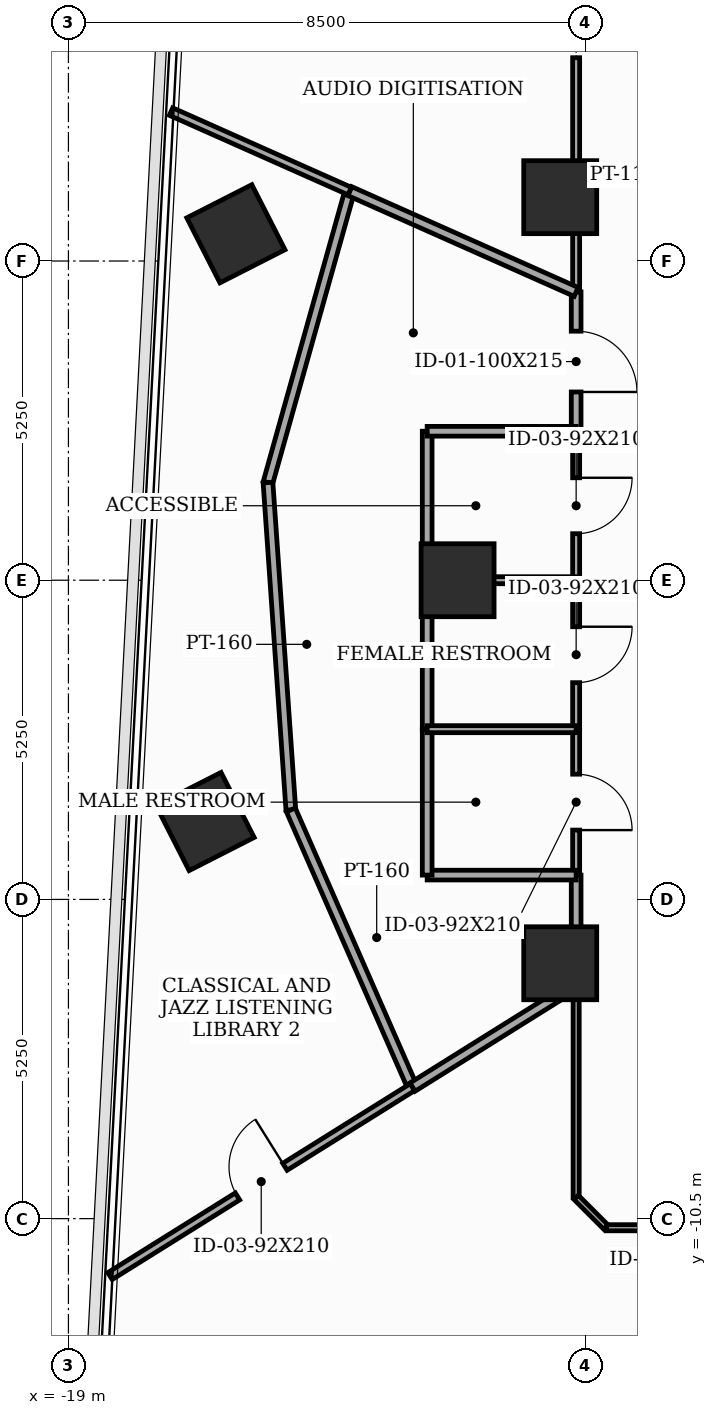
"""IFC4 building model, lengths in metres.
Left out: names, types, materials, properties, quantities, classifications, styles, units other than length and angle.
Written with IfcOpenShell. Run it as: python <this file> out.ifc"""

import sys

from ifc_helpers import new_model, si_unit, direction, frame, frame_2d, origin, origin_2d, place, context, subcontext, project, spatial, rectangle, extrude, element, fill, save


model = new_model("IFC4")
c1 = context("Model", 3, precision=1e-05, world=origin(), true_north=direction((0.0, 1.0)))
c2 = subcontext(c1, "Body", "Model", "MODEL_VIEW")
j1 = project(units=[si_unit("LENGTHUNIT", "METRE"), si_unit("PLANEANGLEUNIT", "RADIAN")], contexts=[c1])
p1 = place(None, origin())
s1 = spatial("IfcSite", under=j1, at=p1, CompositionType="ELEMENT")
p2 = place(p1, origin())
s2 = spatial("IfcBuilding", under=s1, at=p2, CompositionType="ELEMENT")
p3 = place(p2, frame((0.0, 0.0, 138.4)))
s3 = spatial("IfcBuildingStorey", under=s2, at=p3, CompositionType="ELEMENT", Elevation=138.4)
for number, where, z_axis, x_axis in (
    (1, (-10.912, 6.3, 0.0), (0.0, 0.0, 1.0), (1.0, 0.0, 0.0)),
    (2, (-12.6, 0.0, 0.0), (0.0, 0.0, 1.0), (1.0, 0.0, 0.0)),
    (3, (-10.912, -6.3, 0.0), (0.0, 0.0, 1.0), (1.0, 0.0, 0.0)),
    (4, (-16.246, 5.698, 0.0), (0.0, 0.0, 1.0), (0.891, 0.454, 0.0)),
    (5, (-16.752, -3.969, 0.0), (0.0, 0.0, 1.0), (0.891, 0.454, 0.0)),
):
    element("IfcColumn", number, at=place(p3, frame(where, z_axis=z_axis, x_axis=x_axis)), inside=s3, PredefinedType="COLUMN", context=c2, shape_type="SweptSolid", body=[
        extrude(rectangle(XDim=1.2, YDim=1.2, at=origin_2d()), origin(), (0.0, 0.0, 1.0), 3.7),
    ])
p4 = place(p3, frame((-10.65, -4.85, 0.0), z_axis=(0.0, 0.0, 1.0), x_axis=(0.0, -1.0, 0.0)))
e6 = element("IfcWall", 6, at=p4, inside=s3, PredefinedType="PARTITIONING", context=c2, shape_type="SweptSolid", body=[
    extrude(rectangle(XDim=1.805, YDim=0.16, at=frame_2d((0.902, 0.0))), origin(), (0.0, 0.0, 1.0), 2.785),
])
p5 = place(p3, frame((-10.65, 4.742, 0.0), z_axis=(0.0, 0.0, 1.0), x_axis=(0.0, -1.0, 0.0)))
e7 = element("IfcWall", 7, at=p5, inside=s3, PredefinedType="PARTITIONING", context=c2, shape_type="SweptSolid", body=[
    extrude(rectangle(XDim=2.292, YDim=0.16, at=frame_2d((1.146, 0.0))), origin(), (0.0, 0.0, 1.0), 3.5),
])
p6 = place(p5, frame((0.646, 0.0, 0.0)))
e8 = element("IfcOpeningElement", 8, at=p6, cuts=e7, PredefinedType="OPENING", context=c2, shape_type="SweptSolid", body=[
    extrude(rectangle(XDim=1.0, YDim=2.15, at=frame_2d((0.5, 1.075))), frame((0.0, 0.09, 0.0), z_axis=(0.0, -1.0, 0.0), x_axis=(1.0, 0.0, 0.0)), (0.0, 0.0, 1.0), 0.18),
])
p7 = place(p3, frame((-10.65, 0.0, 0.0), z_axis=(0.0, 0.0, 1.0), x_axis=(0.0, -1.0, 0.0)))
e9 = element("IfcWall", 9, at=p7, inside=s3, PredefinedType="PARTITIONING", context=c2, shape_type="SweptSolid", body=[
    extrude(rectangle(XDim=2.45, YDim=0.115, at=frame_2d((1.225, 0.0))), origin(), (0.0, 0.0, 1.0), 2.785),
])
p8 = place(p7, frame((0.765, 0.0, 0.0)))
e10 = element("IfcOpeningElement", 10, at=p8, cuts=e9, PredefinedType="OPENING", context=c2, shape_type="SweptSolid", body=[
    extrude(rectangle(XDim=0.92, YDim=2.1, at=frame_2d((0.46, 1.05))), frame((0.0, 0.067, 0.0), z_axis=(0.0, -1.0, 0.0), x_axis=(1.0, 0.0, 0.0)), (0.0, 0.0, 1.0), 0.135),
])
p9 = place(p3, frame((-10.65, -2.45, 0.0), z_axis=(0.0, 0.0, 1.0), x_axis=(0.0, -1.0, 0.0)))
e11 = element("IfcWall", 11, at=p9, inside=s3, PredefinedType="PARTITIONING", context=c2, shape_type="SweptSolid", body=[
    extrude(rectangle(XDim=2.4, YDim=0.115, at=frame_2d((1.2, 0.0))), origin(), (0.0, 0.0, 1.0), 3.5),
])
p10 = place(p9, frame((0.74, 0.0, 0.0)))
e12 = element("IfcOpeningElement", 12, at=p10, cuts=e11, PredefinedType="OPENING", context=c2, shape_type="SweptSolid", body=[
    extrude(rectangle(XDim=0.92, YDim=2.1, at=frame_2d((0.46, 1.05))), frame((0.0, 0.067, 0.0), z_axis=(0.0, -1.0, 0.0), x_axis=(1.0, 0.0, 0.0)), (0.0, 0.0, 1.0), 0.135),
])
p11 = place(p3, frame((-10.65, -6.655, 0.0), z_axis=(0.0, 0.0, 1.0), x_axis=(0.0, -1.0, 0.0)))
e13 = element("IfcWall", 13, at=p11, inside=s3, PredefinedType="MOVABLE", context=c2, shape_type="SweptSolid", body=[
    extrude(rectangle(XDim=3.495, YDim=0.1, at=frame_2d((1.748, 0.0))), origin(), (0.0, 0.0, 1.0), 2.785),
])
p12 = place(p3, frame((-10.65, -10.15, 0.0), z_axis=(0.0, 0.0, 1.0), x_axis=(0.707106781187, -0.707106781187, 0.0)))
e14 = element("IfcWall", 14, at=p12, inside=s3, PredefinedType="MOVABLE", context=c2, shape_type="SweptSolid", body=[
    extrude(rectangle(XDim=0.707, YDim=0.1, at=frame_2d((0.354, 0.0))), origin(), (0.0, 0.0, 1.0), 3.5),
])
p13 = place(p3, frame((-10.15, -10.65, 0.0), z_axis=(0.0, 0.0, 1.0), x_axis=(1.0, 0.0, 0.0)))
e15 = element("IfcWall", 15, at=p13, inside=s3, PredefinedType="MOVABLE", context=c2, shape_type="SweptSolid", body=[
    extrude(rectangle(XDim=5.847, YDim=0.1, at=frame_2d((2.923, 0.0))), origin(), (0.0, 0.0, 1.0), 2.785),
])
p14 = place(p13, frame((0.709, 0.0, 0.0)))
e16 = element("IfcOpeningElement", 16, at=p14, cuts=e15, PredefinedType="OPENING", context=c2, shape_type="SweptSolid", body=[
    extrude(rectangle(XDim=0.92, YDim=2.1, at=frame_2d((0.46, 1.05))), frame((0.0, 0.06, 0.0), z_axis=(0.0, -1.0, 0.0), x_axis=(1.0, 0.0, 0.0)), (0.0, 0.0, 1.0), 0.12),
])
p15 = place(p3, frame((-10.65, 10.15, 0.0), z_axis=(0.0, 0.0, 1.0), x_axis=(0.0, -1.0, 0.0)))
e17 = element("IfcWall", 17, at=p15, inside=s3, PredefinedType="PARTITIONING", context=c2, shape_type="SweptSolid", body=[
    extrude(rectangle(XDim=5.408, YDim=0.115, at=frame_2d((2.704, 0.0))), origin(), (0.0, 0.0, 1.0), 2.785),
])
p16 = place(p15, frame((0.607, 0.0, 0.0)))
e18 = element("IfcOpeningElement", 18, at=p16, cuts=e17, PredefinedType="OPENING", context=c2, shape_type="SweptSolid", body=[
    extrude(rectangle(XDim=0.95, YDim=2.1, at=frame_2d((0.475, 1.05))), frame((0.0, 0.067, 0.0), z_axis=(0.0, -1.0, 0.0), x_axis=(1.0, 0.0, 0.0)), (0.0, 0.0, 1.0), 0.135),
])
p17 = place(p3, frame((-10.65, 2.45, 0.0), z_axis=(0.0, 0.0, 1.0), x_axis=(0.0, -1.0, 0.0)))
e19 = element("IfcWall", 19, at=p17, inside=s3, PredefinedType="PARTITIONING", context=c2, shape_type="SweptSolid", body=[
    extrude(rectangle(XDim=2.45, YDim=0.115, at=frame_2d((1.225, 0.0))), origin(), (0.0, 0.0, 1.0), 2.785),
])
p18 = place(p17, frame((0.765, 0.0, 0.0)))
e20 = element("IfcOpeningElement", 20, at=p18, cuts=e19, PredefinedType="OPENING", context=c2, shape_type="SweptSolid", body=[
    extrude(rectangle(XDim=0.92, YDim=2.1, at=frame_2d((0.46, 1.05))), frame((0.0, 0.067, 0.0), z_axis=(0.0, -1.0, 0.0), x_axis=(1.0, 0.0, 0.0)), (0.0, 0.0, 1.0), 0.135),
])
p19 = place(p3, frame((-13.1, -2.45, 0.0), z_axis=(0.0, 0.0, 1.0), x_axis=(0.0, 1.0, 0.0)))
e21 = element("IfcWall", 21, at=p19, inside=s3, PredefinedType="PARTITIONING", context=c2, shape_type="SweptSolid", body=[
    extrude(rectangle(XDim=2.45, YDim=0.16, at=frame_2d((1.225, 0.0))), origin(), (0.0, 0.0, 1.0), 2.885),
])
p20 = place(p3, frame((-14.374, 6.4, 0.0), z_axis=(0.0, 0.0, 1.0), x_axis=(-0.269944572541, -0.962875863108, 0.0)))
e22 = element("IfcWall", 22, at=p20, inside=s3, PredefinedType="PARTITIONING", context=c2, shape_type="SweptSolid", body=[
    extrude(rectangle(XDim=4.979, YDim=0.16, at=frame_2d((2.489, 0.0))), origin(), (0.0, 0.0, 1.0), 2.885),
])
p21 = place(p3, frame((-15.718, 1.606, 0.0), z_axis=(0.0, 0.0, 1.0), x_axis=(0.069662122655, -0.997570643447, 0.0)))
e23 = element("IfcWall", 23, at=p21, inside=s3, PredefinedType="PARTITIONING", context=c2, shape_type="SweptSolid", body=[
    extrude(rectangle(XDim=5.397, YDim=0.16, at=frame_2d((2.699, 0.0))), origin(), (0.0, 0.0, 1.0), 2.885),
])
p22 = place(p3, frame((-15.342, -3.778, 0.0), z_axis=(0.0, 0.0, 1.0), x_axis=(0.401510696769, -0.915854333604, 0.0)))
e24 = element("IfcWall", 24, at=p22, inside=s3, PredefinedType="PARTITIONING", context=c2, shape_type="SweptSolid", body=[
    extrude(rectangle(XDim=4.979, YDim=0.16, at=frame_2d((2.489, 0.0))), origin(), (0.0, 0.0, 1.0), 3.125),
])
p23 = place(p3, frame((-10.65, -4.85, 0.0), z_axis=(0.0, 0.0, 1.0), x_axis=(-1.0, 0.0, 0.0)))
e25 = element("IfcWall", 25, at=p23, inside=s3, PredefinedType="PARTITIONING", context=c2, shape_type="SweptSolid", body=[
    extrude(rectangle(XDim=2.45, YDim=0.16, at=frame_2d((1.225, 0.0))), origin(), (0.0, 0.0, 1.0), 2.785),
])
p24 = place(p3, frame((-13.1, -4.85, 0.0), z_axis=(0.0, 0.0, 1.0), x_axis=(0.0, 1.0, 0.0)))
e26 = element("IfcWall", 26, at=p24, inside=s3, PredefinedType="PARTITIONING", context=c2, shape_type="SweptSolid", body=[
    extrude(rectangle(XDim=2.4, YDim=0.16, at=frame_2d((1.2, 0.0))), origin(), (0.0, 0.0, 1.0), 3.5),
])
p25 = place(p3, frame((-13.343, -8.338, 0.0), z_axis=(0.0, 0.0, 1.0), x_axis=(0.848045809732, 0.52992292326, 0.0)))
e27 = element("IfcWall", 27, at=p25, inside=s3, PredefinedType="PARTITIONING", context=c2, shape_type="SweptSolid", body=[
    extrude(rectangle(XDim=3.176, YDim=0.16, at=frame_2d((1.588, 0.0))), origin(), (0.0, 0.0, 1.0), 2.785),
])
p26 = place(p3, frame((-10.65, 4.742, 0.0), z_axis=(0.0, 0.0, 1.0), x_axis=(-0.913556992648, 0.406710734042, 0.0)))
e28 = element("IfcWall", 28, at=p26, inside=s3, PredefinedType="PARTITIONING", context=c2, shape_type="SweptSolid", body=[
    extrude(rectangle(XDim=4.076, YDim=0.16, at=frame_2d((2.038, 0.0))), origin(), (0.0, 0.0, 1.0), 2.785),
])
p27 = place(p3, frame((-13.1, 0.0, 0.0), z_axis=(0.0, 0.0, 1.0), x_axis=(0.0, 1.0, 0.0)))
e29 = element("IfcWall", 29, at=p27, inside=s3, PredefinedType="PARTITIONING", context=c2, shape_type="SweptSolid", body=[
    extrude(rectangle(XDim=2.45, YDim=0.16, at=frame_2d((1.225, 0.0))), origin(), (0.0, 0.0, 1.0), 3.5),
])
p28 = place(p3, frame((-13.1, 2.45, 0.0), z_axis=(0.0, 0.0, 1.0), x_axis=(1.0, 0.0, 0.0)))
e30 = element("IfcWall", 30, at=p28, inside=s3, PredefinedType="PARTITIONING", context=c2, shape_type="SweptSolid", body=[
    extrude(rectangle(XDim=2.45, YDim=0.16, at=frame_2d((1.225, 0.0))), origin(), (0.0, 0.0, 1.0), 2.785),
])
for number, where, z_axis, x_axis in (
    (31, (-13.1, -2.45, 0.0), (0.0, 0.0, 1.0), (1.0, 0.0, 0.0)),
    (32, (-10.65, 0.0, 0.0), (0.0, 0.0, 1.0), (-1.0, 0.0, 0.0)),
):
    element("IfcWall", number, at=place(p3, frame(where, z_axis=z_axis, x_axis=x_axis)), inside=s3, PredefinedType="PARTITIONING", context=c2, shape_type="SweptSolid", body=[
        extrude(rectangle(XDim=2.45, YDim=0.115, at=frame_2d((1.225, 0.0))), origin(), (0.0, 0.0, 1.0), 2.785),
    ])
p29 = place(p3, frame((-18.316, -11.445, 0.0), z_axis=(0.0, 0.0, 1.0), x_axis=(0.848103549297, 0.529830510324, 0.0)))
e33 = element("IfcWall", 33, at=p29, inside=s3, PredefinedType="PARTITIONING", context=c2, shape_type="SweptSolid", body=[
    extrude(rectangle(XDim=5.864, YDim=0.135, at=frame_2d((2.932, 0.0))), origin(), (0.0, 0.0, 1.0), 2.985),
])
p30 = place(p29, frame((2.472, 0.0, 0.0)))
e34 = element("IfcOpeningElement", 34, at=p30, cuts=e33, PredefinedType="OPENING", context=c2, shape_type="SweptSolid", body=[
    extrude(rectangle(XDim=0.92, YDim=2.1, at=frame_2d((0.46, 1.05))), frame((0.0, 0.077, 0.0), z_axis=(0.0, -1.0, 0.0), x_axis=(1.0, 0.0, 0.0)), (0.0, 0.0, 1.0), 0.155),
])
p31 = place(p3, frame((-14.374, 6.4, 0.0), z_axis=(0.0, 0.0, 1.0), x_axis=(-0.913611090133, 0.406589198068, 0.0)))
e35 = element("IfcWall", 35, at=p31, inside=s3, PredefinedType="PARTITIONING", context=c2, shape_type="SweptSolid", body=[
    extrude(rectangle(XDim=3.216, YDim=0.135, at=frame_2d((1.608, 0.0))), origin(), (0.0, 0.0, 1.0), 2.985),
])
p32 = place(p3, frame((-10.102, -25.003, 0.0), z_axis=(0.0, 0.0, 1.0), x_axis=(0.374591600556, 0.927189911935, 0.0)))
e36 = element("IfcWall", 36, at=p32, inside=s3, PredefinedType="MOVABLE", context=c2, shape_type="SweptSolid", body=[
    extrude(rectangle(XDim=15.48, YDim=0.1, at=frame_2d((7.74, 0.0))), origin(), (0.0, 0.0, 1.0), 2.785),
])
p33 = place(p6, origin())
e37 = element("IfcDoor", 37, at=p33, inside=s3, OperationType="SINGLE_SWING_RIGHT", PredefinedType="DOOR", context=c2, shape_type="SweptSolid", body=[
    extrude(rectangle(XDim=1.0, YDim=2.15, at=frame_2d((0.5, 1.075))), frame((0.0, 0.025, 0.0), z_axis=(0.0, -1.0, 0.0), x_axis=(1.0, 0.0, 0.0)), (0.0, 0.0, 1.0), 0.05),
])
fill(e8, e37)
p34 = place(p8, origin())
e38 = element("IfcDoor", 38, at=p34, inside=s3, OperationType="SINGLE_SWING_LEFT", PredefinedType="DOOR", context=c2, shape_type="SweptSolid", body=[
    extrude(rectangle(XDim=0.92, YDim=2.1, at=frame_2d((0.46, 1.05))), frame((0.0, 0.025, 0.0), z_axis=(0.0, -1.0, 0.0), x_axis=(1.0, 0.0, 0.0)), (0.0, 0.0, 1.0), 0.05),
])
fill(e10, e38)
p35 = place(p10, origin())
e39 = element("IfcDoor", 39, at=p35, inside=s3, OperationType="SINGLE_SWING_RIGHT", PredefinedType="DOOR", context=c2, shape_type="SweptSolid", body=[
    extrude(rectangle(XDim=0.92, YDim=2.1, at=frame_2d((0.46, 1.05))), frame((0.0, 0.025, 0.0), z_axis=(0.0, -1.0, 0.0), x_axis=(1.0, 0.0, 0.0)), (0.0, 0.0, 1.0), 0.05),
])
fill(e12, e39)
p36 = place(p16, origin())
e40 = element("IfcDoor", 40, at=p36, inside=s3, OperationType="SLIDING_TO_LEFT", PredefinedType="DOOR", context=c2, shape_type="SweptSolid", body=[
    extrude(rectangle(XDim=0.95, YDim=2.1, at=frame_2d((0.475, 1.05))), frame((0.0, 0.025, 0.0), z_axis=(0.0, -1.0, 0.0), x_axis=(1.0, 0.0, 0.0)), (0.0, 0.0, 1.0), 0.05),
])
fill(e18, e40)
p37 = place(p18, origin())
e41 = element("IfcDoor", 41, at=p37, inside=s3, OperationType="SINGLE_SWING_LEFT", PredefinedType="DOOR", context=c2, shape_type="SweptSolid", body=[
    extrude(rectangle(XDim=0.92, YDim=2.1, at=frame_2d((0.46, 1.05))), frame((0.0, 0.025, 0.0), z_axis=(0.0, -1.0, 0.0), x_axis=(1.0, 0.0, 0.0)), (0.0, 0.0, 1.0), 0.05),
])
fill(e20, e41)
p38 = place(p30, origin())
e42 = element("IfcDoor", 42, at=p38, inside=s3, OperationType="SINGLE_SWING_RIGHT", PredefinedType="DOOR", context=c2, shape_type="SweptSolid", body=[
    extrude(rectangle(XDim=0.92, YDim=2.1, at=frame_2d((0.46, 1.05))), frame((0.0, 0.025, 0.0), z_axis=(0.0, -1.0, 0.0), x_axis=(1.0, 0.0, 0.0)), (0.0, 0.0, 1.0), 0.05),
])
fill(e34, e42)
save(model, sys.argv[1])
